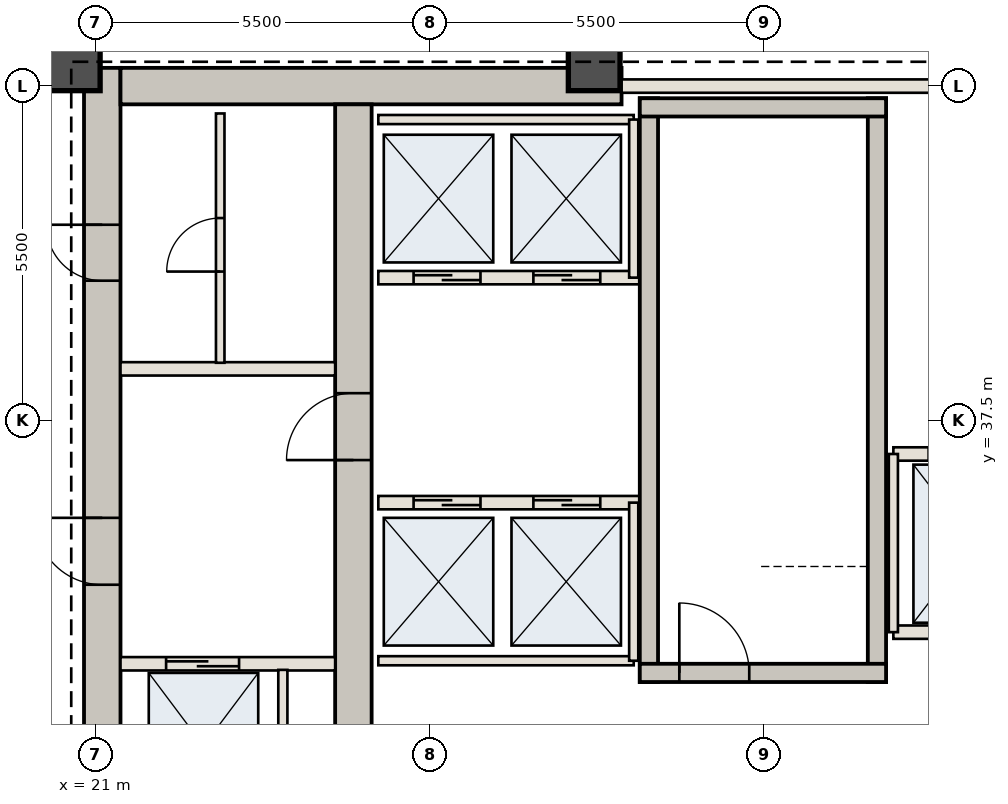
"""IFC4 building model, lengths in metres.
Left out: names, types, materials, properties, quantities, classifications, styles, units other than length and angle.
Written with IfcOpenShell. Run it as: python <this file> out.ifc"""

import sys

from ifc_helpers import new_model, si_unit, direction, frame, frame_2d, origin, origin_2d, place, context, subcontext, project, spatial, rectangle, extrude, element, fill, save


model = new_model("IFC4")
c1 = context("Model", 3, precision=1e-05, world=origin(), true_north=direction((0.0, 1.0)))
c2 = subcontext(c1, "Body", "Model", "MODEL_VIEW")
j1 = project(units=[si_unit("LENGTHUNIT", "METRE"), si_unit("PLANEANGLEUNIT", "RADIAN")], contexts=[c1])
p1 = place(None, origin())
s1 = spatial("IfcSite", under=j1, at=p1, CompositionType="ELEMENT")
p2 = place(p1, origin())
s2 = spatial("IfcBuilding", under=s1, at=p2, CompositionType="ELEMENT")
p3 = place(p2, frame((0.0, 0.0, 182.35)))
s3 = spatial("IfcBuildingStorey", under=s2, at=p3, CompositionType="ELEMENT", Elevation=182.35)
p4 = place(p3, frame((21.11, 30.6, 0.0), z_axis=(0.0, 0.0, 1.0), x_axis=(0.0, 1.0, 0.0)))
e1 = element("IfcWall", 1, at=p4, inside=s3, PredefinedType="SHEAR", context=c2, shape_type="SweptSolid", body=[
    extrude(rectangle(XDim=12.7, YDim=0.6, at=frame_2d((6.35, 0.0))), origin(), (0.0, 0.0, 1.0), 4.55),
])
p5 = place(p4, frame((4.2, 0.0, 0.0)))
e2 = element("IfcOpeningElement", 2, at=p5, cuts=e1, PredefinedType="OPENING", context=c2, shape_type="SweptSolid", body=[
    extrude(rectangle(XDim=1.1, YDim=2.15, at=frame_2d((0.55, 1.075))), frame((0.0, 0.31, 0.0), z_axis=(0.0, -1.0, 0.0), x_axis=(1.0, 0.0, 0.0)), (0.0, 0.0, 1.0), 0.62),
])
p6 = place(p4, frame((9.2, 0.0, 0.0)))
e3 = element("IfcOpeningElement", 3, at=p6, cuts=e1, PredefinedType="OPENING", context=c2, shape_type="SweptSolid", body=[
    extrude(rectangle(XDim=0.92, YDim=2.1, at=frame_2d((0.46, 1.05))), frame((0.0, 0.31, 0.0), z_axis=(0.0, -1.0, 0.0), x_axis=(1.0, 0.0, 0.0)), (0.0, 0.0, 1.0), 0.62),
])
p7 = place(p3, frame((21.41, 43.0, 0.0), z_axis=(0.0, 0.0, 1.0), x_axis=(1.0, 0.0, 0.0)))
e4 = element("IfcWall", 4, at=p7, inside=s3, PredefinedType="SHEAR", context=c2, shape_type="SweptSolid", body=[
    extrude(rectangle(XDim=8.24, YDim=0.6, at=frame_2d((4.12, 0.0))), origin(), (0.0, 0.0, 1.0), 4.55),
])
p8 = place(p3, frame((25.24, 30.6, 0.0), z_axis=(0.0, 0.0, 1.0), x_axis=(0.0, 1.0, 0.0)))
e5 = element("IfcWall", 5, at=p8, inside=s3, PredefinedType="SHEAR", context=c2, shape_type="SweptSolid", body=[
    extrude(rectangle(XDim=12.1, YDim=0.6, at=frame_2d((6.05, 0.0))), origin(), (0.0, 0.0, 1.0), 4.55),
])
p9 = place(p8, frame((6.25, 0.0, 0.0)))
e6 = element("IfcOpeningElement", 6, at=p9, cuts=e5, PredefinedType="OPENING", context=c2, shape_type="SweptSolid", body=[
    extrude(rectangle(XDim=1.1, YDim=2.15, at=frame_2d((0.55, 1.075))), frame((0.0, 0.31, 0.0), z_axis=(0.0, -1.0, 0.0), x_axis=(1.0, 0.0, 0.0)), (0.0, 0.0, 1.0), 0.62),
])
for number, where, z_axis, x_axis in (
    (7, (29.2, 43.35, 0.0), (0.0, 0.0, 1.0), (1.0, 0.0, 0.0)),
    (8, (20.65, 43.35, 0.0), (0.0, 0.0, 1.0), (1.0, 0.0, 0.0)),
):
    element("IfcColumn", number, at=place(p3, frame(where, z_axis=z_axis, x_axis=x_axis)), inside=s3, PredefinedType="COLUMN", context=c2, shape_type="SweptSolid", body=[
        extrude(rectangle(XDim=0.85, YDim=0.85, at=origin_2d()), origin(), (0.0, 0.0, 1.0), 4.55),
    ])
p10 = place(p3, frame((21.41, 33.5, 0.0), z_axis=(0.0, 0.0, 1.0), x_axis=(1.0, 0.0, 0.0)))
e9 = element("IfcWall", 9, at=p10, inside=s3, PredefinedType="STANDARD", context=c2, shape_type="SweptSolid", body=[
    extrude(rectangle(XDim=3.53, YDim=0.22, at=frame_2d((1.765, 0.0))), origin(), (0.0, 0.0, 1.0), 4.13),
])
p11 = place(p10, frame((0.75, 0.0, 0.0)))
e10 = element("IfcOpeningElement", 10, at=p11, cuts=e9, PredefinedType="OPENING", context=c2, shape_type="SweptSolid", body=[
    extrude(rectangle(XDim=1.2, YDim=2.2, at=frame_2d((0.6, 1.1))), frame((0.0, 0.12, 0.0), z_axis=(0.0, -1.0, 0.0), x_axis=(1.0, 0.0, 0.0)), (0.0, 0.0, 1.0), 0.24),
])
p12 = place(p3, frame((24.08, 30.75, 0.0), z_axis=(0.0, 0.0, 1.0), x_axis=(0.0, 1.0, 0.0)))
e11 = element("IfcWall", 11, at=p12, inside=s3, PredefinedType="STANDARD", context=c2, shape_type="SweptSolid", body=[
    extrude(rectangle(XDim=2.65, YDim=0.15, at=frame_2d((1.325, 0.0))), origin(), (0.0, 0.0, 1.0), 4.13),
])
p13 = place(p3, frame((21.41, 38.35, 0.0), z_axis=(0.0, 0.0, 1.0), x_axis=(1.0, 0.0, 0.0)))
e12 = element("IfcWall", 12, at=p13, inside=s3, PredefinedType="STANDARD", context=c2, shape_type="SweptSolid", body=[
    extrude(rectangle(XDim=3.53, YDim=0.22, at=frame_2d((1.765, 0.0))), origin(), (0.0, 0.0, 1.0), 4.13),
])
p14 = place(p3, frame((23.05, 38.45, 0.0), z_axis=(0.0, 0.0, 1.0), x_axis=(0.0, 1.0, 0.0)))
e13 = element("IfcWall", 13, at=p14, inside=s3, PredefinedType="STANDARD", context=c2, shape_type="SweptSolid", body=[
    extrude(rectangle(XDim=4.1, YDim=0.14, at=frame_2d((2.05, 0.0))), origin(), (0.0, 0.0, 1.0), 4.13),
])
p15 = place(p14, frame((1.5, 0.0, 0.0)))
e14 = element("IfcOpeningElement", 14, at=p15, cuts=e13, PredefinedType="OPENING", context=c2, shape_type="SweptSolid", body=[
    extrude(rectangle(XDim=0.88, YDim=2.1, at=frame_2d((0.44, 1.05))), frame((0.0, 0.08, 0.0), z_axis=(0.0, -1.0, 0.0), x_axis=(1.0, 0.0, 0.0)), (0.0, 0.0, 1.0), 0.16),
])
p16 = place(p3, frame((25.65, 36.15, 0.0), z_axis=(0.0, 0.0, 1.0), x_axis=(1.0, 0.0, 0.0)))
e15 = element("IfcWall", 15, at=p16, inside=s3, PredefinedType="STANDARD", context=c2, shape_type="SweptSolid", body=[
    extrude(rectangle(XDim=4.3, YDim=0.22, at=frame_2d((2.15, 0.0))), origin(), (0.0, 0.0, 1.0), 4.13),
])
p17 = place(p16, frame((0.58, 0.0, 0.0)))
e16 = element("IfcOpeningElement", 16, at=p17, cuts=e15, PredefinedType="OPENING", context=c2, shape_type="SweptSolid", body=[
    extrude(rectangle(XDim=1.1, YDim=2.15, at=frame_2d((0.55, 1.075))), frame((0.0, 0.12, 0.0), z_axis=(0.0, -1.0, 0.0), x_axis=(1.0, 0.0, 0.0)), (0.0, 0.0, 1.0), 0.24),
])
p18 = place(p16, frame((2.55, 0.0, 0.0)))
e17 = element("IfcOpeningElement", 17, at=p18, cuts=e15, PredefinedType="OPENING", context=c2, shape_type="SweptSolid", body=[
    extrude(rectangle(XDim=1.1, YDim=2.15, at=frame_2d((0.55, 1.075))), frame((0.0, 0.12, 0.0), z_axis=(0.0, -1.0, 0.0), x_axis=(1.0, 0.0, 0.0)), (0.0, 0.0, 1.0), 0.24),
])
p19 = place(p3, frame((25.65, 33.55, 0.0), z_axis=(0.0, 0.0, 1.0), x_axis=(1.0, 0.0, 0.0)))
e18 = element("IfcWall", 18, at=p19, inside=s3, PredefinedType="STANDARD", context=c2, shape_type="SweptSolid", body=[
    extrude(rectangle(XDim=4.2, YDim=0.15, at=frame_2d((2.1, 0.0))), origin(), (0.0, 0.0, 1.0), 4.13),
])
p20 = place(p3, frame((29.85, 33.55, 0.0), z_axis=(0.0, 0.0, 1.0), x_axis=(0.0, 1.0, 0.0)))
e19 = element("IfcWall", 19, at=p20, inside=s3, PredefinedType="STANDARD", context=c2, shape_type="SweptSolid", body=[
    extrude(rectangle(XDim=2.6, YDim=0.15, at=frame_2d((1.3, 0.0))), origin(), (0.0, 0.0, 1.0), 4.13),
])
p21 = place(p3, frame((25.65, 39.85, 0.0), z_axis=(0.0, 0.0, 1.0), x_axis=(1.0, 0.0, 0.0)))
e20 = element("IfcWall", 20, at=p21, inside=s3, PredefinedType="STANDARD", context=c2, shape_type="SweptSolid", body=[
    extrude(rectangle(XDim=4.3, YDim=0.22, at=frame_2d((2.15, 0.0))), origin(), (0.0, 0.0, 1.0), 4.13),
])
p22 = place(p21, frame((0.58, 0.0, 0.0)))
e21 = element("IfcOpeningElement", 21, at=p22, cuts=e20, PredefinedType="OPENING", context=c2, shape_type="SweptSolid", body=[
    extrude(rectangle(XDim=1.1, YDim=2.15, at=frame_2d((0.55, 1.075))), frame((0.0, 0.12, 0.0), z_axis=(0.0, -1.0, 0.0), x_axis=(1.0, 0.0, 0.0)), (0.0, 0.0, 1.0), 0.24),
])
p23 = place(p21, frame((2.55, 0.0, 0.0)))
e22 = element("IfcOpeningElement", 22, at=p23, cuts=e20, PredefinedType="OPENING", context=c2, shape_type="SweptSolid", body=[
    extrude(rectangle(XDim=1.1, YDim=2.15, at=frame_2d((0.55, 1.075))), frame((0.0, 0.12, 0.0), z_axis=(0.0, -1.0, 0.0), x_axis=(1.0, 0.0, 0.0)), (0.0, 0.0, 1.0), 0.24),
])
p24 = place(p3, frame((25.65, 42.45, 0.0), z_axis=(0.0, 0.0, 1.0), x_axis=(1.0, 0.0, 0.0)))
e23 = element("IfcWall", 23, at=p24, inside=s3, PredefinedType="STANDARD", context=c2, shape_type="SweptSolid", body=[
    extrude(rectangle(XDim=4.2, YDim=0.15, at=frame_2d((2.1, 0.0))), origin(), (0.0, 0.0, 1.0), 4.13),
])
p25 = place(p3, frame((29.85, 39.85, 0.0), z_axis=(0.0, 0.0, 1.0), x_axis=(0.0, 1.0, 0.0)))
e24 = element("IfcWall", 24, at=p25, inside=s3, PredefinedType="STANDARD", context=c2, shape_type="SweptSolid", body=[
    extrude(rectangle(XDim=2.6, YDim=0.15, at=frame_2d((1.3, 0.0))), origin(), (0.0, 0.0, 1.0), 4.13),
])
for number, where, z_axis, x_axis in (
    (25, (30.1, 33.2, 0.0), (0.0, 0.0, 1.0), (0.0, 1.0, 0.0)),
    (26, (33.85, 33.2, 0.0), (0.0, 0.0, 1.0), (0.0, 1.0, 0.0)),
):
    element("IfcWall", number, at=place(p3, frame(where, z_axis=z_axis, x_axis=x_axis)), inside=s3, PredefinedType="SHEAR", context=c2, shape_type="SweptSolid", body=[
        extrude(rectangle(XDim=9.6, YDim=0.3, at=frame_2d((4.8, 0.0))), origin(), (0.0, 0.0, 1.0), 4.13),
    ])
p26 = place(p3, frame((29.95, 33.35, 0.0), z_axis=(0.0, 0.0, 1.0), x_axis=(1.0, 0.0, 0.0)))
e27 = element("IfcWall", 27, at=p26, inside=s3, PredefinedType="SHEAR", context=c2, shape_type="SweptSolid", body=[
    extrude(rectangle(XDim=4.05, YDim=0.3, at=frame_2d((2.025, 0.0))), origin(), (0.0, 0.0, 1.0), 4.13),
])
p27 = place(p26, frame((0.65, 0.0, 0.0)))
e28 = element("IfcOpeningElement", 28, at=p27, cuts=e27, PredefinedType="OPENING", context=c2, shape_type="SweptSolid", body=[
    extrude(rectangle(XDim=1.15, YDim=2.15, at=frame_2d((0.575, 1.075))), frame((0.0, 0.16, 0.0), z_axis=(0.0, -1.0, 0.0), x_axis=(1.0, 0.0, 0.0)), (0.0, 0.0, 1.0), 0.32),
])
p28 = place(p3, frame((29.95, 42.65, 0.0), z_axis=(0.0, 0.0, 1.0), x_axis=(1.0, 0.0, 0.0)))
e29 = element("IfcWall", 29, at=p28, inside=s3, PredefinedType="SHEAR", context=c2, shape_type="SweptSolid", body=[
    extrude(rectangle(XDim=4.05, YDim=0.3, at=frame_2d((2.025, 0.0))), origin(), (0.0, 0.0, 1.0), 4.13),
])
p29 = place(p3, frame((29.65, 43.0, 0.0), z_axis=(0.0, 0.0, 1.0), x_axis=(1.0, 0.0, 0.0)))
e30 = element("IfcWall", 30, at=p29, inside=s3, PredefinedType="STANDARD", context=c2, shape_type="SweptSolid", body=[
    extrude(rectangle(XDim=8.1, YDim=0.22, at=frame_2d((4.05, 0.0))), origin(), (0.0, 0.0, 1.0), 4.13),
])
p30 = place(p29, frame((5.95, 0.0, 0.0)))
e31 = element("IfcOpeningElement", 31, at=p30, cuts=e30, PredefinedType="OPENING", context=c2, shape_type="SweptSolid", body=[
    extrude(rectangle(XDim=1.1, YDim=2.15, at=frame_2d((0.55, 1.075))), frame((0.0, 0.12, 0.0), z_axis=(0.0, -1.0, 0.0), x_axis=(1.0, 0.0, 0.0)), (0.0, 0.0, 1.0), 0.24),
])
p31 = place(p3, frame((34.12, 36.95, 0.0), z_axis=(0.0, 0.0, 1.0), x_axis=(1.0, 0.0, 0.0)))
e32 = element("IfcWall", 32, at=p31, inside=s3, PredefinedType="STANDARD", context=c2, shape_type="SweptSolid", body=[
    extrude(rectangle(XDim=2.68, YDim=0.22, at=frame_2d((1.34, 0.0))), origin(), (0.0, 0.0, 1.0), 4.13),
])
p32 = place(p31, frame((0.58, 0.0, 0.0)))
e33 = element("IfcOpeningElement", 33, at=p32, cuts=e32, PredefinedType="OPENING", context=c2, shape_type="SweptSolid", body=[
    extrude(rectangle(XDim=1.2, YDim=2.2, at=frame_2d((0.6, 1.1))), frame((0.0, 0.12, 0.0), z_axis=(0.0, -1.0, 0.0), x_axis=(1.0, 0.0, 0.0)), (0.0, 0.0, 1.0), 0.24),
])
p33 = place(p3, frame((34.12, 34.02, 0.0), z_axis=(0.0, 0.0, 1.0), x_axis=(1.0, 0.0, 0.0)))
e34 = element("IfcWall", 34, at=p33, inside=s3, PredefinedType="STANDARD", context=c2, shape_type="SweptSolid", body=[
    extrude(rectangle(XDim=2.68, YDim=0.22, at=frame_2d((1.34, 0.0))), origin(), (0.0, 0.0, 1.0), 4.13),
])
p34 = place(p3, frame((34.12, 34.02, 0.0), z_axis=(0.0, 0.0, 1.0), x_axis=(0.0, 1.0, 0.0)))
e35 = element("IfcWall", 35, at=p34, inside=s3, PredefinedType="STANDARD", context=c2, shape_type="SweptSolid", body=[
    extrude(rectangle(XDim=2.93, YDim=0.15, at=frame_2d((1.465, 0.0))), origin(), (0.0, 0.0, 1.0), 4.13),
])
p35 = place(p5, origin())
e36 = element("IfcDoor", 36, at=p35, inside=s3, OperationType="SINGLE_SWING_RIGHT", PredefinedType="DOOR", context=c2, shape_type="SweptSolid", body=[
    extrude(rectangle(XDim=1.1, YDim=2.15, at=frame_2d((0.55, 1.075))), frame((0.0, 0.025, 0.0), z_axis=(0.0, -1.0, 0.0), x_axis=(1.0, 0.0, 0.0)), (0.0, 0.0, 1.0), 0.05),
])
fill(e2, e36)
p36 = place(p9, origin())
e37 = element("IfcDoor", 37, at=p36, inside=s3, OperationType="SINGLE_SWING_LEFT", PredefinedType="DOOR", context=c2, shape_type="SweptSolid", body=[
    extrude(rectangle(XDim=1.1, YDim=2.15, at=frame_2d((0.55, 1.075))), frame((0.0, 0.025, 0.0), z_axis=(0.0, -1.0, 0.0), x_axis=(1.0, 0.0, 0.0)), (0.0, 0.0, 1.0), 0.05),
])
fill(e6, e37)
p37 = place(p6, origin())
e38 = element("IfcDoor", 38, at=p37, inside=s3, OperationType="SINGLE_SWING_RIGHT", PredefinedType="DOOR", context=c2, shape_type="SweptSolid", body=[
    extrude(rectangle(XDim=0.92, YDim=2.1, at=frame_2d((0.46, 1.05))), frame((0.0, 0.025, 0.0), z_axis=(0.0, -1.0, 0.0), x_axis=(1.0, 0.0, 0.0)), (0.0, 0.0, 1.0), 0.05),
])
fill(e3, e38)
p38 = place(p11, origin())
e39 = element("IfcDoor", 39, at=p38, inside=s3, OperationType="DOUBLE_DOOR_SLIDING", PredefinedType="DOOR", context=c2, shape_type="SweptSolid", body=[
    extrude(rectangle(XDim=1.2, YDim=2.2, at=frame_2d((0.6, 1.1))), frame((0.0, 0.025, 0.0), z_axis=(0.0, -1.0, 0.0), x_axis=(1.0, 0.0, 0.0)), (0.0, 0.0, 1.0), 0.05),
])
fill(e10, e39)
p39 = place(p15, origin())
e40 = element("IfcDoor", 40, at=p39, inside=s3, OperationType="SINGLE_SWING_LEFT", PredefinedType="DOOR", context=c2, shape_type="SweptSolid", body=[
    extrude(rectangle(XDim=0.88, YDim=2.1, at=frame_2d((0.44, 1.05))), frame((0.0, 0.025, 0.0), z_axis=(0.0, -1.0, 0.0), x_axis=(1.0, 0.0, 0.0)), (0.0, 0.0, 1.0), 0.05),
])
fill(e14, e40)
p40 = place(p17, origin())
e41 = element("IfcDoor", 41, at=p40, inside=s3, OperationType="DOUBLE_DOOR_SLIDING", PredefinedType="DOOR", context=c2, shape_type="SweptSolid", body=[
    extrude(rectangle(XDim=1.1, YDim=2.15, at=frame_2d((0.55, 1.075))), frame((0.0, 0.025, 0.0), z_axis=(0.0, -1.0, 0.0), x_axis=(1.0, 0.0, 0.0)), (0.0, 0.0, 1.0), 0.05),
])
fill(e16, e41)
p41 = place(p18, origin())
e42 = element("IfcDoor", 42, at=p41, inside=s3, OperationType="DOUBLE_DOOR_SLIDING", PredefinedType="DOOR", context=c2, shape_type="SweptSolid", body=[
    extrude(rectangle(XDim=1.1, YDim=2.15, at=frame_2d((0.55, 1.075))), frame((0.0, 0.025, 0.0), z_axis=(0.0, -1.0, 0.0), x_axis=(1.0, 0.0, 0.0)), (0.0, 0.0, 1.0), 0.05),
])
fill(e17, e42)
p42 = place(p22, origin())
e43 = element("IfcDoor", 43, at=p42, inside=s3, OperationType="DOUBLE_DOOR_SLIDING", PredefinedType="DOOR", context=c2, shape_type="SweptSolid", body=[
    extrude(rectangle(XDim=1.1, YDim=2.15, at=frame_2d((0.55, 1.075))), frame((0.0, 0.025, 0.0), z_axis=(0.0, -1.0, 0.0), x_axis=(1.0, 0.0, 0.0)), (0.0, 0.0, 1.0), 0.05),
])
fill(e21, e43)
p43 = place(p23, origin())
e44 = element("IfcDoor", 44, at=p43, inside=s3, OperationType="DOUBLE_DOOR_SLIDING", PredefinedType="DOOR", context=c2, shape_type="SweptSolid", body=[
    extrude(rectangle(XDim=1.1, YDim=2.15, at=frame_2d((0.55, 1.075))), frame((0.0, 0.025, 0.0), z_axis=(0.0, -1.0, 0.0), x_axis=(1.0, 0.0, 0.0)), (0.0, 0.0, 1.0), 0.05),
])
fill(e22, e44)
p44 = place(p27, origin())
e45 = element("IfcDoor", 45, at=p44, inside=s3, OperationType="SINGLE_SWING_LEFT", PredefinedType="DOOR", context=c2, shape_type="SweptSolid", body=[
    extrude(rectangle(XDim=1.15, YDim=2.15, at=frame_2d((0.575, 1.075))), frame((0.0, 0.025, 0.0), z_axis=(0.0, -1.0, 0.0), x_axis=(1.0, 0.0, 0.0)), (0.0, 0.0, 1.0), 0.05),
])
fill(e28, e45)
save(model, sys.argv[1])
